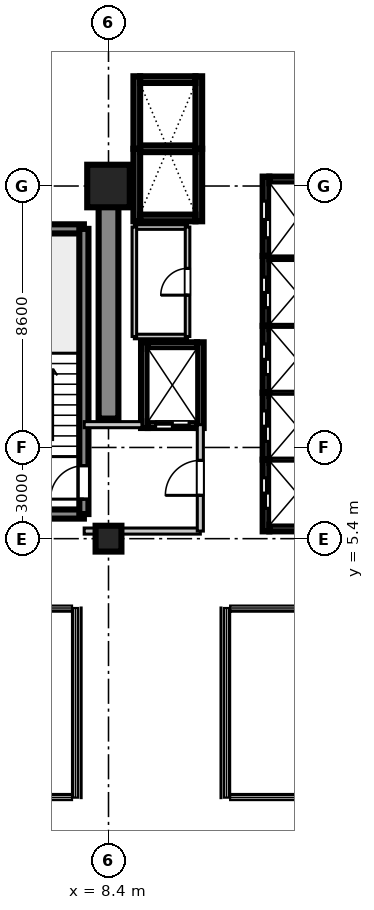
"""IFC4 building model, lengths in metres.
Left out: names, types, materials, properties, quantities, classifications, styles, units other than length and angle.
Written with IfcOpenShell. Run it as: python <this file> out.ifc"""

import sys

from ifc_helpers import new_model, si_unit, direction, frame, frame_2d, origin, origin_2d, place, context, subcontext, project, spatial, rectangle, extrude, source, transform, mapped, element, fill, save


model = new_model("IFC4")
c1 = context("Model", 3, precision=1e-05, world=origin(), true_north=direction((0.0, 1.0)))
c2 = subcontext(c1, "Body", "Model", "MODEL_VIEW")
j1 = project(units=[si_unit("LENGTHUNIT", "METRE"), si_unit("PLANEANGLEUNIT", "RADIAN")], contexts=[c1])
p1 = place(None, origin())
s1 = spatial("IfcSite", under=j1, at=p1, CompositionType="ELEMENT")
p2 = place(p1, origin())
s2 = spatial("IfcBuilding", under=s1, at=p2, CompositionType="ELEMENT")
p3 = place(p2, frame((0.0, 0.0, 68.9)))
s3 = spatial("IfcBuildingStorey", under=s2, at=p3, CompositionType="ELEMENT", Elevation=68.9)
m1 = source(origin(), c2, "Body", "SweptSolid", [
    extrude(rectangle(XDim=0.85, YDim=0.85, at=origin_2d()), origin(), (0.0, 0.0, 1.0), 3.605),
])
p4 = place(p3, frame((8.4, 5.4, 0.0), z_axis=(0.0, 0.0, 1.0), x_axis=(1.0, 0.0, 0.0)))
e1 = element("IfcColumn", 1, at=p4, inside=s3, PredefinedType="PILASTER", context=c2, shape_type="MappedRepresentation", body=[
    mapped(m1, transform((0.0, 0.0, 0.0), scale=1.0)),
])
m2 = source(origin(), c2, "Body", "SweptSolid", [
    extrude(rectangle(XDim=1.4, YDim=1.4, at=origin_2d()), origin(), (0.0, 0.0, 1.0), 3.605),
])
p5 = place(p3, frame((8.4, 17.0, 0.0), z_axis=(0.0, 0.0, 1.0), x_axis=(1.0, 0.0, 0.0)))
e2 = element("IfcColumn", 2, at=p5, inside=s3, PredefinedType="COLUMN", context=c2, shape_type="MappedRepresentation", body=[
    mapped(m2, transform((0.0, 0.0, 0.0), scale=1.0)),
])
m3 = source(origin(), c2, "Body", "SweptSolid", [
    extrude(rectangle(XDim=7.65, YDim=0.65, at=frame_2d((3.825, 0.0))), origin(), (0.0, 0.0, 1.0), 3.37),
])
p6 = place(p3, frame((8.4, 9.35, 0.0), z_axis=(0.0, 0.0, 1.0), x_axis=(0.0, 1.0, 0.0)))
e3 = element("IfcWall", 3, at=p6, inside=s3, PredefinedType="SHEAR", context=c2, shape_type="MappedRepresentation", body=[
    mapped(m3, transform((0.0, 0.0, 0.0), scale=1.0)),
])
m4 = source(origin(), c2, "Body", "SweptSolid", [
    extrude(rectangle(XDim=3.98, YDim=0.3, at=frame_2d((1.99, 0.0))), origin(), (0.0, 0.0, 1.0), 3.37),
])
for number, where, z_axis, x_axis in (
    (4, (3.61, 6.21, 0.0), (0.0, 0.0, 1.0), (1.0, 0.0, 0.0)),
    (5, (3.61, 15.59, 0.0), (0.0, 0.0, 1.0), (1.0, 0.0, 0.0)),
):
    element("IfcWall", number, at=place(p3, frame(where, z_axis=z_axis, x_axis=x_axis)), inside=s3, PredefinedType="SHEAR", context=c2, shape_type="MappedRepresentation", body=[
        mapped(m4, transform((0.0, 0.0, 0.0), scale=1.0)),
    ])
m5 = source(origin(), c2, "Body", "SweptSolid", [
    extrude(rectangle(XDim=9.38, YDim=0.3, at=frame_2d((4.69, 0.0))), origin(), (0.0, 0.0, 1.0), 3.37),
])
p7 = place(p3, frame((7.59, 6.21, 0.0), z_axis=(0.0, 0.0, 1.0), x_axis=(0.0, 1.0, 0.0)))
e6 = element("IfcWall", 6, at=p7, inside=s3, PredefinedType="SHEAR", context=c2, shape_type="MappedRepresentation", body=[
    mapped(m5, transform((0.0, 0.0, 0.0), scale=1.0)),
])
p8 = place(p7, frame((0.49, 0.0, 0.0)))
e7 = element("IfcOpeningElement", 7, at=p8, cuts=e6, PredefinedType="OPENING", context=c2, shape_type="SweptSolid", body=[
    extrude(rectangle(XDim=1.1, YDim=2.15, at=frame_2d((0.55, 1.075))), frame((0.0, 0.16, 0.0), z_axis=(0.0, -1.0, 0.0), x_axis=(1.0, 0.0, 0.0)), (0.0, 0.0, 1.0), 0.32),
])
m6 = source(origin(), c2, "Body", "SweptSolid", [
    extrude(rectangle(XDim=2.36, YDim=0.22, at=frame_2d((1.18, 0.0))), origin(), (0.0, 0.0, 1.0), 3.37),
])
p9 = place(p3, frame((13.58, 5.64, 0.0), z_axis=(0.0, 0.0, 1.0), x_axis=(0.0, 1.0, 0.0)))
e8 = element("IfcWall", 8, at=p9, inside=s3, PredefinedType="SHEAR", context=c2, shape_type="MappedRepresentation", body=[
    mapped(m6, transform((0.0, 0.0, 0.0), scale=1.0)),
])
p10 = place(p9, frame((0.76, 0.0, 0.0)))
e9 = element("IfcOpeningElement", 9, at=p10, cuts=e8, PredefinedType="OPENING", context=c2, shape_type="SweptSolid", body=[
    extrude(rectangle(XDim=1.0, YDim=2.2, at=frame_2d((0.5, 1.1))), frame((0.0, 0.12, 0.0), z_axis=(0.0, -1.0, 0.0), x_axis=(1.0, 0.0, 0.0)), (0.0, 0.0, 1.0), 0.24),
])
m7 = source(origin(), c2, "Body", "SweptSolid", [
    extrude(rectangle(XDim=1.82, YDim=0.22, at=frame_2d((0.91, 0.0))), origin(), (0.0, 0.0, 1.0), 3.37),
])
p11 = place(p3, frame((13.69, 5.75, 0.0), z_axis=(0.0, 0.0, 1.0), x_axis=(1.0, 0.0, 0.0)))
e10 = element("IfcWall", 10, at=p11, inside=s3, PredefinedType="SHEAR", context=c2, shape_type="MappedRepresentation", body=[
    mapped(m7, transform((0.0, 0.0, 0.0), scale=1.0)),
])
m8 = source(origin(), c2, "Body", "SweptSolid", [
    extrude(rectangle(XDim=1.82, YDim=0.22, at=frame_2d((0.91, 0.0))), origin(), (0.0, 0.0, 1.0), 3.65),
])
p12 = place(p3, frame((13.69, 8.0, 0.0), z_axis=(0.0, 0.0, 1.0), x_axis=(1.0, 0.0, 0.0)))
e11 = element("IfcWall", 11, at=p12, inside=s3, PredefinedType="SHEAR", context=c2, shape_type="MappedRepresentation", body=[
    mapped(m8, transform((0.0, 0.0, 0.0), scale=1.0)),
])
m9 = source(origin(), c2, "Body", "SweptSolid", [
    extrude(rectangle(XDim=2.2, YDim=0.22, at=frame_2d((1.1, 0.0))), origin(), (0.0, 0.0, 1.0), 3.37),
])
p13 = place(p3, frame((13.58, 8.0, 0.0), z_axis=(0.0, 0.0, 1.0), x_axis=(0.0, 1.0, 0.0)))
e12 = element("IfcWall", 12, at=p13, inside=s3, PredefinedType="SHEAR", context=c2, shape_type="MappedRepresentation", body=[
    mapped(m9, transform((0.0, 0.0, 0.0), scale=1.0)),
])
p14 = place(p13, frame((0.6, 0.0, 0.0)))
e13 = element("IfcOpeningElement", 13, at=p14, cuts=e12, PredefinedType="OPENING", context=c2, shape_type="SweptSolid", body=[
    extrude(rectangle(XDim=1.0, YDim=2.2, at=frame_2d((0.5, 1.1))), frame((0.0, 0.12, 0.0), z_axis=(0.0, -1.0, 0.0), x_axis=(1.0, 0.0, 0.0)), (0.0, 0.0, 1.0), 0.24),
])
p15 = place(p3, frame((13.69, 10.2, 0.0), z_axis=(0.0, 0.0, 1.0), x_axis=(1.0, 0.0, 0.0)))
e14 = element("IfcWall", 14, at=p15, inside=s3, PredefinedType="SHEAR", context=c2, shape_type="MappedRepresentation", body=[
    mapped(m8, transform((0.0, 0.0, 0.0), scale=1.0)),
])
p16 = place(p3, frame((13.58, 10.2, 0.0), z_axis=(0.0, 0.0, 1.0), x_axis=(0.0, 1.0, 0.0)))
e15 = element("IfcWall", 15, at=p16, inside=s3, PredefinedType="SHEAR", context=c2, shape_type="MappedRepresentation", body=[
    mapped(m9, transform((0.0, 0.0, 0.0), scale=1.0)),
])
p17 = place(p16, frame((0.6, 0.0, 0.0)))
e16 = element("IfcOpeningElement", 16, at=p17, cuts=e15, PredefinedType="OPENING", context=c2, shape_type="SweptSolid", body=[
    extrude(rectangle(XDim=1.0, YDim=2.2, at=frame_2d((0.5, 1.1))), frame((0.0, 0.12, 0.0), z_axis=(0.0, -1.0, 0.0), x_axis=(1.0, 0.0, 0.0)), (0.0, 0.0, 1.0), 0.24),
])
p18 = place(p3, frame((13.69, 12.4, 0.0), z_axis=(0.0, 0.0, 1.0), x_axis=(1.0, 0.0, 0.0)))
e17 = element("IfcWall", 17, at=p18, inside=s3, PredefinedType="SHEAR", context=c2, shape_type="MappedRepresentation", body=[
    mapped(m8, transform((0.0, 0.0, 0.0), scale=1.0)),
])
m10 = source(origin(), c2, "Body", "SweptSolid", [
    extrude(rectangle(XDim=2.3, YDim=0.22, at=frame_2d((1.15, 0.0))), origin(), (0.0, 0.0, 1.0), 3.37),
])
p19 = place(p3, frame((13.58, 12.4, 0.0), z_axis=(0.0, 0.0, 1.0), x_axis=(0.0, 1.0, 0.0)))
e18 = element("IfcWall", 18, at=p19, inside=s3, PredefinedType="SHEAR", context=c2, shape_type="MappedRepresentation", body=[
    mapped(m10, transform((0.0, 0.0, 0.0), scale=1.0)),
])
p20 = place(p19, frame((0.6, 0.0, 0.0)))
e19 = element("IfcOpeningElement", 19, at=p20, cuts=e18, PredefinedType="OPENING", context=c2, shape_type="SweptSolid", body=[
    extrude(rectangle(XDim=1.0, YDim=2.2, at=frame_2d((0.5, 1.1))), frame((0.0, 0.12, 0.0), z_axis=(0.0, -1.0, 0.0), x_axis=(1.0, 0.0, 0.0)), (0.0, 0.0, 1.0), 0.24),
])
p21 = place(p3, frame((13.69, 14.7, 0.0), z_axis=(0.0, 0.0, 1.0), x_axis=(1.0, 0.0, 0.0)))
e20 = element("IfcWall", 20, at=p21, inside=s3, PredefinedType="SHEAR", context=c2, shape_type="MappedRepresentation", body=[
    mapped(m8, transform((0.0, 0.0, 0.0), scale=1.0)),
])
m11 = source(origin(), c2, "Body", "SweptSolid", [
    extrude(rectangle(XDim=2.385, YDim=0.22, at=frame_2d((1.192, 0.0))), origin(), (0.0, 0.0, 1.0), 3.37),
])
for number, where, z_axis, x_axis in (
    (21, (9.33, 15.84, 0.0), (0.0, 0.0, 1.0), (0.0, 1.0, 0.0)),
    (22, (11.37, 15.84, 0.0), (0.0, 0.0, 1.0), (0.0, 1.0, 0.0)),
):
    element("IfcWall", number, at=place(p3, frame(where, z_axis=z_axis, x_axis=x_axis)), inside=s3, PredefinedType="SHEAR", context=c2, shape_type="MappedRepresentation", body=[
        mapped(m11, transform((0.0, 0.0, 0.0), scale=1.0)),
    ])
p22 = place(p3, frame((9.44, 15.95, 0.0), z_axis=(0.0, 0.0, 1.0), x_axis=(1.0, 0.0, 0.0)))
e23 = element("IfcWall", 23, at=p22, inside=s3, PredefinedType="SHEAR", context=c2, shape_type="MappedRepresentation", body=[
    mapped(m7, transform((0.0, 0.0, 0.0), scale=1.0)),
])
p23 = place(p3, frame((9.44, 18.225, 0.0), z_axis=(0.0, 0.0, 1.0), x_axis=(1.0, 0.0, 0.0)))
e24 = element("IfcWall", 24, at=p23, inside=s3, PredefinedType="SHEAR", context=c2, shape_type="MappedRepresentation", body=[
    mapped(m8, transform((0.0, 0.0, 0.0), scale=1.0)),
])
for number, where, z_axis, x_axis in (
    (25, (9.33, 18.225, 0.0), (0.0, 0.0, 1.0), (0.0, 1.0, 0.0)),
    (26, (11.37, 18.225, 0.0), (0.0, 0.0, 1.0), (0.0, 1.0, 0.0)),
):
    element("IfcWall", number, at=place(p3, frame(where, z_axis=z_axis, x_axis=x_axis)), inside=s3, PredefinedType="SHEAR", context=c2, shape_type="MappedRepresentation", body=[
        mapped(m11, transform((0.0, 0.0, 0.0), scale=1.0)),
    ])
p24 = place(p3, frame((9.44, 20.5, 0.0), z_axis=(0.0, 0.0, 1.0), x_axis=(1.0, 0.0, 0.0)))
e27 = element("IfcWall", 27, at=p24, inside=s3, PredefinedType="SHEAR", context=c2, shape_type="MappedRepresentation", body=[
    mapped(m7, transform((0.0, 0.0, 0.0), scale=1.0)),
])
m12 = source(origin(), c2, "Body", "SweptSolid", [
    extrude(rectangle(XDim=2.82, YDim=0.22, at=frame_2d((1.41, 0.0))), origin(), (0.0, 0.0, 1.0), 3.37),
])
for number, where, z_axis, x_axis in (
    (28, (9.58, 9.04, 0.0), (0.0, 0.0, 1.0), (0.0, 1.0, 0.0)),
    (29, (11.42, 9.04, 0.0), (0.0, 0.0, 1.0), (0.0, 1.0, 0.0)),
):
    element("IfcWall", number, at=place(p3, frame(where, z_axis=z_axis, x_axis=x_axis)), inside=s3, PredefinedType="SHEAR", context=c2, shape_type="MappedRepresentation", body=[
        mapped(m12, transform((0.0, 0.0, 0.0), scale=1.0)),
    ])
m13 = source(origin(), c2, "Body", "SweptSolid", [
    extrude(rectangle(XDim=1.62, YDim=0.22, at=frame_2d((0.81, 0.0))), origin(), (0.0, 0.0, 1.0), 3.37),
])
p25 = place(p3, frame((9.69, 9.15, 0.0), z_axis=(0.0, 0.0, 1.0), x_axis=(1.0, 0.0, 0.0)))
e30 = element("IfcWall", 30, at=p25, inside=s3, PredefinedType="SHEAR", context=c2, shape_type="MappedRepresentation", body=[
    mapped(m13, transform((0.0, 0.0, 0.0), scale=1.0)),
])
p26 = place(p25, frame((0.26, 0.0, 0.0)))
e31 = element("IfcOpeningElement", 31, at=p26, cuts=e30, PredefinedType="OPENING", context=c2, shape_type="SweptSolid", body=[
    extrude(rectangle(XDim=1.1, YDim=2.2, at=frame_2d((0.55, 1.1))), frame((0.0, 0.12, 0.0), z_axis=(0.0, -1.0, 0.0), x_axis=(1.0, 0.0, 0.0)), (0.0, 0.0, 1.0), 0.24),
])
p27 = place(p3, frame((9.69, 11.75, 0.0), z_axis=(0.0, 0.0, 1.0), x_axis=(1.0, 0.0, 0.0)))
e32 = element("IfcWall", 32, at=p27, inside=s3, PredefinedType="SHEAR", context=c2, shape_type="MappedRepresentation", body=[
    mapped(m13, transform((0.0, 0.0, 0.0), scale=1.0)),
])
m14 = source(origin(), c2, "Body", "SweptSolid", [
    extrude(rectangle(XDim=2.61, YDim=0.22, at=frame_2d((1.305, 0.0))), origin(), (0.0, 0.0, 1.0), 3.37),
])
p28 = place(p3, frame((13.58, 14.7, 0.0), z_axis=(0.0, 0.0, 1.0), x_axis=(0.0, 1.0, 0.0)))
e33 = element("IfcWall", 33, at=p28, inside=s3, PredefinedType="SHEAR", context=c2, shape_type="MappedRepresentation", body=[
    mapped(m14, transform((0.0, 0.0, 0.0), scale=1.0)),
])
p29 = place(p28, frame((0.6, 0.0, 0.0)))
e34 = element("IfcOpeningElement", 34, at=p29, cuts=e33, PredefinedType="OPENING", context=c2, shape_type="SweptSolid", body=[
    extrude(rectangle(XDim=1.2, YDim=2.2, at=frame_2d((0.6, 1.1))), frame((0.0, 0.12, 0.0), z_axis=(0.0, -1.0, 0.0), x_axis=(1.0, 0.0, 0.0)), (0.0, 0.0, 1.0), 0.24),
])
p30 = place(p3, frame((13.69, 17.2, 0.0), z_axis=(0.0, 0.0, 1.0), x_axis=(1.0, 0.0, 0.0)))
e35 = element("IfcWall", 35, at=p30, inside=s3, PredefinedType="SHEAR", context=c2, shape_type="MappedRepresentation", body=[
    mapped(m7, transform((0.0, 0.0, 0.0), scale=1.0)),
])
m15 = source(origin(), c2, "Body", "SweptSolid", [
    extrude(rectangle(XDim=3.82, YDim=0.2, at=frame_2d((1.91, 0.0))), origin(), (0.0, 0.0, 1.0), 2.71),
])
p31 = place(p3, frame((7.6, 5.65, 0.0), z_axis=(0.0, 0.0, 1.0), x_axis=(1.0, 0.0, 0.0)))
e36 = element("IfcWall", 36, at=p31, inside=s3, PredefinedType="PARTITIONING", context=c2, shape_type="MappedRepresentation", body=[
    mapped(m15, transform((0.0, 0.0, 0.0), scale=1.0)),
])
m16 = source(origin(), c2, "Body", "SweptSolid", [
    extrude(rectangle(XDim=1.9, YDim=0.2, at=frame_2d((0.95, 0.0))), origin(), (0.0, 0.0, 1.0), 2.71),
])
p32 = place(p3, frame((7.6, 9.15, 0.0), z_axis=(0.0, 0.0, 1.0), x_axis=(1.0, 0.0, 0.0)))
e37 = element("IfcWall", 37, at=p32, inside=s3, PredefinedType="PARTITIONING", context=c2, shape_type="MappedRepresentation", body=[
    mapped(m16, transform((0.0, 0.0, 0.0), scale=1.0)),
])
m17 = source(origin(), c2, "Body", "SweptSolid", [
    extrude(rectangle(XDim=3.5, YDim=0.2, at=frame_2d((1.75, 0.0))), origin(), (0.0, 0.0, 1.0), 2.71),
])
p33 = place(p3, frame((11.42, 5.65, 0.0), z_axis=(0.0, 0.0, 1.0), x_axis=(0.0, 1.0, 0.0)))
e38 = element("IfcWall", 38, at=p33, inside=s3, PredefinedType="PARTITIONING", context=c2, shape_type="MappedRepresentation", body=[
    mapped(m17, transform((0.0, 0.0, 0.0), scale=1.0)),
])
p34 = place(p33, frame((1.175, 0.0, 0.0)))
e39 = element("IfcOpeningElement", 39, at=p34, cuts=e38, PredefinedType="OPENING", context=c2, shape_type="SweptSolid", body=[
    extrude(rectangle(XDim=1.15, YDim=2.15, at=frame_2d((0.575, 1.075))), frame((0.0, 0.11, 0.0), z_axis=(0.0, -1.0, 0.0), x_axis=(1.0, 0.0, 0.0)), (0.0, 0.0, 1.0), 0.22),
])
m18 = source(origin(), c2, "Body", "SweptSolid", [
    extrude(rectangle(XDim=1.75, YDim=0.15, at=frame_2d((0.875, 0.0))), origin(), (0.0, 0.0, 1.0), 2.71),
])
for number, where, z_axis, x_axis in (
    (40, (9.25, 12.05, 0.0), (0.0, 0.0, 1.0), (1.0, 0.0, 0.0)),
    (41, (9.25, 15.65, 0.0), (0.0, 0.0, 1.0), (1.0, 0.0, 0.0)),
):
    element("IfcWall", number, at=place(p3, frame(where, z_axis=z_axis, x_axis=x_axis)), inside=s3, PredefinedType="PARTITIONING", context=c2, shape_type="MappedRepresentation", body=[
        mapped(m18, transform((0.0, 0.0, 0.0), scale=1.0)),
    ])
m19 = source(origin(), c2, "Body", "SweptSolid", [
    extrude(rectangle(XDim=3.6, YDim=0.15, at=frame_2d((1.8, 0.0))), origin(), (0.0, 0.0, 1.0), 2.71),
])
p35 = place(p3, frame((9.25, 12.05, 0.0), z_axis=(0.0, 0.0, 1.0), x_axis=(0.0, 1.0, 0.0)))
e42 = element("IfcWall", 42, at=p35, inside=s3, PredefinedType="PARTITIONING", context=c2, shape_type="MappedRepresentation", body=[
    mapped(m19, transform((0.0, 0.0, 0.0), scale=1.0)),
])
p36 = place(p3, frame((11.0, 12.05, 0.0), z_axis=(0.0, 0.0, 1.0), x_axis=(0.0, 1.0, 0.0)))
e43 = element("IfcWall", 43, at=p36, inside=s3, PredefinedType="PARTITIONING", context=c2, shape_type="MappedRepresentation", body=[
    mapped(m19, transform((0.0, 0.0, 0.0), scale=1.0)),
])
p37 = place(p36, frame((1.36, 0.0, 0.0)))
e44 = element("IfcOpeningElement", 44, at=p37, cuts=e43, PredefinedType="OPENING", context=c2, shape_type="SweptSolid", body=[
    extrude(rectangle(XDim=0.88, YDim=2.1, at=frame_2d((0.44, 1.05))), frame((0.0, 0.085, 0.0), z_axis=(0.0, -1.0, 0.0), x_axis=(1.0, 0.0, 0.0)), (0.0, 0.0, 1.0), 0.17),
])
m20 = source(origin(), c2, "Body", "SweptSolid", [
    extrude(rectangle(XDim=1.1, YDim=2.15, at=frame_2d((0.55, 1.075))), frame((0.0, 0.025, 0.0), z_axis=(0.0, -1.0, 0.0), x_axis=(1.0, 0.0, 0.0)), (0.0, 0.0, 1.0), 0.05),
])
p38 = place(p8, origin())
e45 = element("IfcDoor", 45, at=p38, inside=s3, OperationType="SINGLE_SWING_LEFT", PredefinedType="DOOR", context=c2, shape_type="MappedRepresentation", body=[
    mapped(m20, transform((0.0, 0.0, 0.0), scale=1.0)),
])
fill(e7, e45)
m21 = source(origin(), c2, "Body", "SweptSolid", [
    extrude(rectangle(XDim=1.0, YDim=2.2, at=frame_2d((0.5, 1.1))), frame((0.0, 0.025, 0.0), z_axis=(0.0, -1.0, 0.0), x_axis=(1.0, 0.0, 0.0)), (0.0, 0.0, 1.0), 0.05),
])
p39 = place(p10, origin())
e46 = element("IfcDoor", 46, at=p39, inside=s3, OperationType="DOUBLE_DOOR_SLIDING", PredefinedType="DOOR", context=c2, shape_type="MappedRepresentation", body=[
    mapped(m21, transform((0.0, 0.0, 0.0), scale=1.0)),
])
fill(e9, e46)
p40 = place(p14, origin())
e47 = element("IfcDoor", 47, at=p40, inside=s3, OperationType="DOUBLE_DOOR_SLIDING", PredefinedType="DOOR", context=c2, shape_type="MappedRepresentation", body=[
    mapped(m21, transform((0.0, 0.0, 0.0), scale=1.0)),
])
fill(e13, e47)
p41 = place(p17, origin())
e48 = element("IfcDoor", 48, at=p41, inside=s3, OperationType="DOUBLE_DOOR_SLIDING", PredefinedType="DOOR", context=c2, shape_type="MappedRepresentation", body=[
    mapped(m21, transform((0.0, 0.0, 0.0), scale=1.0)),
])
fill(e16, e48)
p42 = place(p20, origin())
e49 = element("IfcDoor", 49, at=p42, inside=s3, OperationType="DOUBLE_DOOR_SLIDING", PredefinedType="DOOR", context=c2, shape_type="MappedRepresentation", body=[
    mapped(m21, transform((0.0, 0.0, 0.0), scale=1.0)),
])
fill(e19, e49)
m22 = source(origin(), c2, "Body", "SweptSolid", [
    extrude(rectangle(XDim=1.1, YDim=2.2, at=frame_2d((0.55, 1.1))), frame((0.0, 0.025, 0.0), z_axis=(0.0, -1.0, 0.0), x_axis=(1.0, 0.0, 0.0)), (0.0, 0.0, 1.0), 0.05),
])
p43 = place(p26, frame((1.1, 0.0, 0.0), z_axis=(0.0, 0.0, 1.0), x_axis=(-1.0, 0.0, 0.0)))
e50 = element("IfcDoor", 50, at=p43, inside=s3, OperationType="DOUBLE_DOOR_SLIDING", PredefinedType="DOOR", context=c2, shape_type="MappedRepresentation", body=[
    mapped(m22, transform((0.0, 0.0, 0.0), scale=1.0)),
])
fill(e31, e50)
m23 = source(origin(), c2, "Body", "SweptSolid", [
    extrude(rectangle(XDim=1.2, YDim=2.2, at=frame_2d((0.6, 1.1))), frame((0.0, 0.025, 0.0), z_axis=(0.0, -1.0, 0.0), x_axis=(1.0, 0.0, 0.0)), (0.0, 0.0, 1.0), 0.05),
])
p44 = place(p29, origin())
e51 = element("IfcDoor", 51, at=p44, inside=s3, OperationType="DOUBLE_DOOR_SLIDING", PredefinedType="DOOR", context=c2, shape_type="MappedRepresentation", body=[
    mapped(m23, transform((0.0, 0.0, 0.0), scale=1.0)),
])
fill(e34, e51)
m24 = source(origin(), c2, "Body", "SweptSolid", [
    extrude(rectangle(XDim=1.15, YDim=2.15, at=frame_2d((0.575, 1.075))), frame((0.0, 0.025, 0.0), z_axis=(0.0, -1.0, 0.0), x_axis=(1.0, 0.0, 0.0)), (0.0, 0.0, 1.0), 0.05),
])
p45 = place(p34, frame((1.15, 0.0, 0.0), z_axis=(0.0, 0.0, 1.0), x_axis=(-1.0, 0.0, 0.0)))
e52 = element("IfcDoor", 52, at=p45, inside=s3, OperationType="SINGLE_SWING_LEFT", PredefinedType="DOOR", context=c2, shape_type="MappedRepresentation", body=[
    mapped(m24, transform((0.0, 0.0, 0.0), scale=1.0)),
])
fill(e39, e52)
m25 = source(origin(), c2, "Body", "SweptSolid", [
    extrude(rectangle(XDim=0.88, YDim=2.1, at=frame_2d((0.44, 1.05))), frame((0.0, 0.025, 0.0), z_axis=(0.0, -1.0, 0.0), x_axis=(1.0, 0.0, 0.0)), (0.0, 0.0, 1.0), 0.05),
])
p46 = place(p37, origin())
e53 = element("IfcDoor", 53, at=p46, inside=s3, OperationType="SINGLE_SWING_LEFT", PredefinedType="DOOR", context=c2, shape_type="MappedRepresentation", body=[
    mapped(m25, transform((0.0, 0.0, 0.0), scale=1.0)),
])
fill(e44, e53)
save(model, sys.argv[1])
